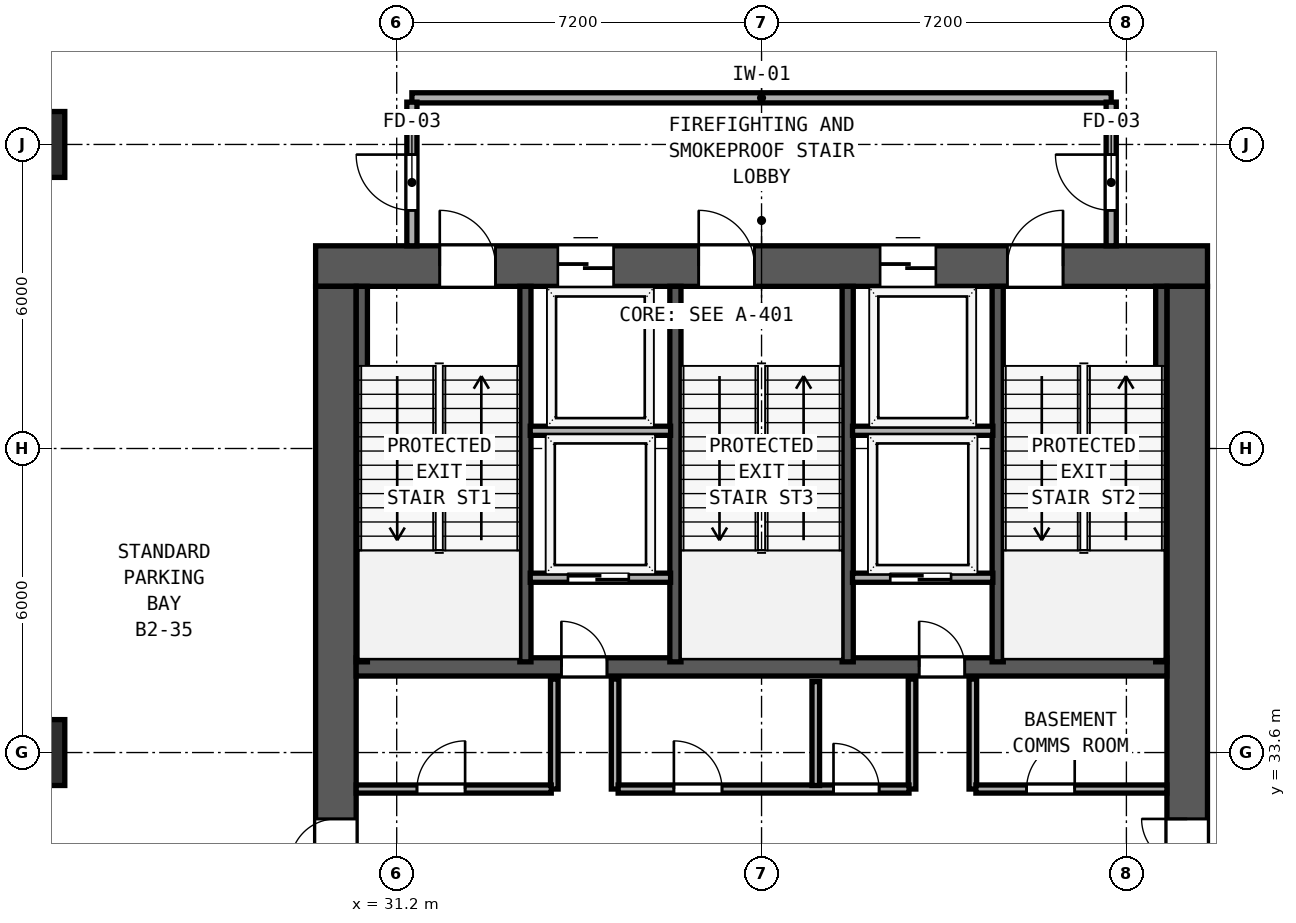
"""IFC4 building model, lengths in metres.
Left out: names, types, materials, properties, quantities, classifications, styles, units other than length and angle.
Written with IfcOpenShell. Run it as: python <this file> out.ifc"""

import sys

from ifc_helpers import new_model, si_unit, direction, frame, frame_2d, origin, origin_2d, place, context, subcontext, project, spatial, rectangle, hollow_rectangle, extrude, element, fill, save


model = new_model("IFC4")
c1 = context("Model", 3, precision=1e-05, world=origin(), true_north=direction((0.0, 1.0)))
c2 = subcontext(c1, "Body", "Model", "MODEL_VIEW")
j1 = project(units=[si_unit("LENGTHUNIT", "METRE"), si_unit("PLANEANGLEUNIT", "RADIAN")], contexts=[c1])
p1 = place(None, origin())
s1 = spatial("IfcSite", under=j1, at=p1, CompositionType="ELEMENT")
p2 = place(p1, origin())
s2 = spatial("IfcBuilding", under=s1, at=p2, CompositionType="ELEMENT")
p3 = place(p2, frame((0.0, 0.0, -9.6)))
s3 = spatial("IfcBuildingStorey", under=s2, at=p3, CompositionType="ELEMENT", Elevation=-9.6)
p4 = place(p3, frame((29.6, 43.2, 0.0), z_axis=(0.0, 0.0, 1.0), x_axis=(1.0, 0.0, 0.0)))
e1 = element("IfcWall", 1, at=p4, inside=s3, PredefinedType="SHEAR", context=c2, shape_type="SweptSolid", body=[
    extrude(rectangle(XDim=17.6, YDim=0.8, at=frame_2d((8.8, 0.0))), origin(), (0.0, 0.0, 1.0), 4.52),
])
p5 = place(p4, frame((2.45, 0.0, 0.0)))
e2 = element("IfcOpeningElement", 2, at=p5, cuts=e1, PredefinedType="OPENING", context=c2, shape_type="SweptSolid", body=[
    extrude(rectangle(XDim=1.1, YDim=2.15, at=frame_2d((0.55, 1.075))), frame((0.0, 0.41, 0.0), z_axis=(0.0, -1.0, 0.0), x_axis=(1.0, 0.0, 0.0)), (0.0, 0.0, 1.0), 0.82),
])
p6 = place(p4, frame((7.56, 0.0, 0.0)))
e3 = element("IfcOpeningElement", 3, at=p6, cuts=e1, PredefinedType="OPENING", context=c2, shape_type="SweptSolid", body=[
    extrude(rectangle(XDim=1.1, YDim=2.15, at=frame_2d((0.55, 1.075))), frame((0.0, 0.41, 0.0), z_axis=(0.0, -1.0, 0.0), x_axis=(1.0, 0.0, 0.0)), (0.0, 0.0, 1.0), 0.82),
])
p7 = place(p4, frame((13.65, 0.0, 0.0)))
e4 = element("IfcOpeningElement", 4, at=p7, cuts=e1, PredefinedType="OPENING", context=c2, shape_type="SweptSolid", body=[
    extrude(rectangle(XDim=1.1, YDim=2.15, at=frame_2d((0.55, 1.075))), frame((0.0, 0.41, 0.0), z_axis=(0.0, -1.0, 0.0), x_axis=(1.0, 0.0, 0.0)), (0.0, 0.0, 1.0), 0.82),
])
p8 = place(p4, frame((4.78, 0.0, 0.0)))
e5 = element("IfcOpeningElement", 5, at=p8, cuts=e1, PredefinedType="OPENING", context=c2, shape_type="SweptSolid", body=[
    extrude(rectangle(XDim=1.1, YDim=2.2, at=frame_2d((0.55, 1.1))), frame((0.0, 0.41, 0.0), z_axis=(0.0, -1.0, 0.0), x_axis=(1.0, 0.0, 0.0)), (0.0, 0.0, 1.0), 0.82),
])
p9 = place(p4, frame((11.14, 0.0, 0.0)))
e6 = element("IfcOpeningElement", 6, at=p9, cuts=e1, PredefinedType="OPENING", context=c2, shape_type="SweptSolid", body=[
    extrude(rectangle(XDim=1.1, YDim=2.2, at=frame_2d((0.55, 1.1))), frame((0.0, 0.41, 0.0), z_axis=(0.0, -1.0, 0.0), x_axis=(1.0, 0.0, 0.0)), (0.0, 0.0, 1.0), 0.82),
])
p10 = place(p3, frame((30.0, 26.8, 0.0), z_axis=(0.0, 0.0, 1.0), x_axis=(0.0, 1.0, 0.0)))
e7 = element("IfcWall", 7, at=p10, inside=s3, PredefinedType="SHEAR", context=c2, shape_type="SweptSolid", body=[
    extrude(rectangle(XDim=16.0, YDim=0.8, at=frame_2d((8.0, 0.0))), origin(), (0.0, 0.0, 1.0), 4.52),
])
p11 = place(p10, frame((4.59, 0.0, 0.0)))
e8 = element("IfcOpeningElement", 8, at=p11, cuts=e7, PredefinedType="OPENING", context=c2, shape_type="SweptSolid", body=[
    extrude(rectangle(XDim=0.9, YDim=2.1, at=frame_2d((0.45, 1.05))), frame((0.0, 0.41, 0.0), z_axis=(0.0, -1.0, 0.0), x_axis=(1.0, 0.0, 0.0)), (0.0, 0.0, 1.0), 0.82),
])
p12 = place(p3, frame((46.8, 26.8, 0.0), z_axis=(0.0, 0.0, 1.0), x_axis=(0.0, 1.0, 0.0)))
e9 = element("IfcWall", 9, at=p12, inside=s3, PredefinedType="SHEAR", context=c2, shape_type="SweptSolid", body=[
    extrude(rectangle(XDim=16.0, YDim=0.8, at=frame_2d((8.0, 0.0))), origin(), (0.0, 0.0, 1.0), 4.52),
])
p13 = place(p12, frame((5.49, 0.0, 0.0), z_axis=(0.0, 0.0, 1.0), x_axis=(-1.0, 0.0, 0.0)))
e10 = element("IfcOpeningElement", 10, at=p13, cuts=e9, PredefinedType="OPENING", context=c2, shape_type="SweptSolid", body=[
    extrude(rectangle(XDim=0.9, YDim=2.1, at=frame_2d((0.45, 1.05))), frame((0.0, 0.41, 0.0), z_axis=(0.0, -1.0, 0.0), x_axis=(1.0, 0.0, 0.0)), (0.0, 0.0, 1.0), 0.82),
])
p14 = place(p3, frame((30.4, 35.29, 0.0), z_axis=(0.0, 0.0, 1.0), x_axis=(1.0, 0.0, 0.0)))
e11 = element("IfcWall", 11, at=p14, inside=s3, PredefinedType="SHEAR", context=c2, shape_type="SweptSolid", body=[
    extrude(rectangle(XDim=16.0, YDim=0.36, at=frame_2d((8.0, 0.0))), origin(), (0.0, 0.0, 1.0), 4.52),
])
p15 = place(p14, frame((4.95, 0.0, 0.0), z_axis=(0.0, 0.0, 1.0), x_axis=(-1.0, 0.0, 0.0)))
e12 = element("IfcOpeningElement", 12, at=p15, cuts=e11, PredefinedType="OPENING", context=c2, shape_type="SweptSolid", body=[
    extrude(rectangle(XDim=0.9, YDim=2.1, at=frame_2d((0.45, 1.05))), frame((0.0, 0.19, 0.0), z_axis=(0.0, -1.0, 0.0), x_axis=(1.0, 0.0, 0.0)), (0.0, 0.0, 1.0), 0.38),
])
p16 = place(p14, frame((12.01, 0.0, 0.0), z_axis=(0.0, 0.0, 1.0), x_axis=(-1.0, 0.0, 0.0)))
e13 = element("IfcOpeningElement", 13, at=p16, cuts=e11, PredefinedType="OPENING", context=c2, shape_type="SweptSolid", body=[
    extrude(rectangle(XDim=0.9, YDim=2.1, at=frame_2d((0.45, 1.05))), frame((0.0, 0.19, 0.0), z_axis=(0.0, -1.0, 0.0), x_axis=(1.0, 0.0, 0.0)), (0.0, 0.0, 1.0), 0.38),
])
for number, where, z_axis, x_axis in (
    (14, (30.512, 35.39, 0.0), (0.0, 0.0, 1.0), (0.0, 1.0, 0.0)),
    (15, (33.74, 35.39, 0.0), (0.0, 0.0, 1.0), (0.0, 1.0, 0.0)),
    (16, (36.7, 35.39, 0.0), (0.0, 0.0, 1.0), (0.0, 1.0, 0.0)),
    (17, (40.1, 35.39, 0.0), (0.0, 0.0, 1.0), (0.0, 1.0, 0.0)),
    (18, (43.06, 35.39, 0.0), (0.0, 0.0, 1.0), (0.0, 1.0, 0.0)),
    (19, (46.288, 35.39, 0.0), (0.0, 0.0, 1.0), (0.0, 1.0, 0.0)),
):
    element("IfcWall", number, at=place(p3, frame(where, z_axis=z_axis, x_axis=x_axis)), inside=s3, PredefinedType="SHEAR", context=c2, shape_type="SweptSolid", body=[
        extrude(rectangle(XDim=7.41, YDim=0.22, at=frame_2d((3.705, 0.0))), origin(), (0.0, 0.0, 1.0), 4.52),
    ])
for number, where, z_axis, x_axis in (
    (20, (24.0, 33.6, 0.0), (0.0, 0.0, 1.0), (1.0, 0.0, 0.0)),
    (21, (24.0, 45.6, 0.0), (0.0, 0.0, 1.0), (1.0, 0.0, 0.0)),
):
    element("IfcColumn", number, at=place(p3, frame(where, z_axis=z_axis, x_axis=x_axis)), inside=s3, PredefinedType="COLUMN", context=c2, shape_type="SweptSolid", body=[
        extrude(hollow_rectangle(XDim=1.3, YDim=1.3, WallThickness=0.048, at=origin_2d()), origin(), (0.0, 0.0, 1.0), 4.8),
    ])
p17 = place(p3, frame((31.5, 46.52, 0.0), z_axis=(0.0, 0.0, 1.0), x_axis=(1.0, 0.0, 0.0)))
e22 = element("IfcWall", 22, at=p17, inside=s3, PredefinedType="SOLIDWALL", context=c2, shape_type="SweptSolid", body=[
    extrude(rectangle(XDim=13.8, YDim=0.2, at=frame_2d((6.9, 0.0))), origin(), (0.0, 0.0, 1.0), 4.52),
])
p18 = place(p3, frame((31.5, 43.6, 0.0), z_axis=(0.0, 0.0, 1.0), x_axis=(0.0, 1.0, 0.0)))
e23 = element("IfcWall", 23, at=p18, inside=s3, PredefinedType="SOLIDWALL", context=c2, shape_type="SweptSolid", body=[
    extrude(rectangle(XDim=2.835, YDim=0.2, at=frame_2d((1.417, 0.0))), origin(), (0.0, 0.0, 1.0), 4.52),
])
p19 = place(p18, frame((1.8, 0.0, 0.0), z_axis=(0.0, 0.0, 1.0), x_axis=(-1.0, 0.0, 0.0)))
e24 = element("IfcOpeningElement", 24, at=p19, cuts=e23, PredefinedType="OPENING", context=c2, shape_type="SweptSolid", body=[
    extrude(rectangle(XDim=1.1, YDim=2.15, at=frame_2d((0.55, 1.075))), frame((0.0, 0.11, 0.0), z_axis=(0.0, -1.0, 0.0), x_axis=(1.0, 0.0, 0.0)), (0.0, 0.0, 1.0), 0.22),
])
p20 = place(p3, frame((45.3, 43.6, 0.0), z_axis=(0.0, 0.0, 1.0), x_axis=(0.0, 1.0, 0.0)))
e25 = element("IfcWall", 25, at=p20, inside=s3, PredefinedType="SOLIDWALL", context=c2, shape_type="SweptSolid", body=[
    extrude(rectangle(XDim=2.835, YDim=0.2, at=frame_2d((1.417, 0.0))), origin(), (0.0, 0.0, 1.0), 4.52),
])
p21 = place(p20, frame((0.7, 0.0, 0.0)))
e26 = element("IfcOpeningElement", 26, at=p21, cuts=e25, PredefinedType="OPENING", context=c2, shape_type="SweptSolid", body=[
    extrude(rectangle(XDim=1.1, YDim=2.15, at=frame_2d((0.55, 1.075))), frame((0.0, 0.11, 0.0), z_axis=(0.0, -1.0, 0.0), x_axis=(1.0, 0.0, 0.0)), (0.0, 0.0, 1.0), 0.22),
])
for number, where, z_axis, x_axis in (
    (27, (33.835, 39.95, 0.0), (0.0, 0.0, 1.0), (1.0, 0.0, 0.0)),
    (28, (40.195, 39.95, 0.0), (0.0, 0.0, 1.0), (1.0, 0.0, 0.0)),
):
    element("IfcWall", number, at=place(p3, frame(where, z_axis=z_axis, x_axis=x_axis)), inside=s3, PredefinedType="SOLIDWALL", context=c2, shape_type="SweptSolid", body=[
        extrude(rectangle(XDim=2.77, YDim=0.18, at=frame_2d((1.385, 0.0))), origin(), (0.0, 0.0, 1.0), 4.52),
    ])
p22 = place(p3, frame((33.835, 37.05, 0.0), z_axis=(0.0, 0.0, 1.0), x_axis=(1.0, 0.0, 0.0)))
e29 = element("IfcWall", 29, at=p22, inside=s3, PredefinedType="SOLIDWALL", context=c2, shape_type="SweptSolid", body=[
    extrude(rectangle(XDim=2.77, YDim=0.18, at=frame_2d((1.385, 0.0))), origin(), (0.0, 0.0, 1.0), 4.52),
])
p23 = place(p22, frame((1.945, 0.0, 0.0), z_axis=(0.0, 0.0, 1.0), x_axis=(-1.0, 0.0, 0.0)))
e30 = element("IfcOpeningElement", 30, at=p23, cuts=e29, PredefinedType="OPENING", context=c2, shape_type="SweptSolid", body=[
    extrude(rectangle(XDim=1.2, YDim=2.2, at=frame_2d((0.6, 1.1))), frame((0.0, 0.1, 0.0), z_axis=(0.0, -1.0, 0.0), x_axis=(1.0, 0.0, 0.0)), (0.0, 0.0, 1.0), 0.2),
])
for number, where, z_axis, x_axis in (
    (31, (34.31, 32.88, 0.0), (0.0, 0.0, 1.0), (0.0, 1.0, 0.0)),
    (32, (35.51, 32.88, 0.0), (0.0, 0.0, 1.0), (0.0, 1.0, 0.0)),
):
    element("IfcWall", number, at=place(p3, frame(where, z_axis=z_axis, x_axis=x_axis)), inside=s3, PredefinedType="SOLIDWALL", context=c2, shape_type="SweptSolid", body=[
        extrude(rectangle(XDim=2.17, YDim=0.15, at=frame_2d((1.085, 0.0))), origin(), (0.0, 0.0, 1.0), 4.52),
    ])
p24 = place(p3, frame((40.195, 37.05, 0.0), z_axis=(0.0, 0.0, 1.0), x_axis=(1.0, 0.0, 0.0)))
e33 = element("IfcWall", 33, at=p24, inside=s3, PredefinedType="SOLIDWALL", context=c2, shape_type="SweptSolid", body=[
    extrude(rectangle(XDim=2.77, YDim=0.18, at=frame_2d((1.385, 0.0))), origin(), (0.0, 0.0, 1.0), 4.52),
])
p25 = place(p24, frame((1.945, 0.0, 0.0), z_axis=(0.0, 0.0, 1.0), x_axis=(-1.0, 0.0, 0.0)))
e34 = element("IfcOpeningElement", 34, at=p25, cuts=e33, PredefinedType="OPENING", context=c2, shape_type="SweptSolid", body=[
    extrude(rectangle(XDim=1.2, YDim=2.2, at=frame_2d((0.6, 1.1))), frame((0.0, 0.1, 0.0), z_axis=(0.0, -1.0, 0.0), x_axis=(1.0, 0.0, 0.0)), (0.0, 0.0, 1.0), 0.2),
])
for number, where, z_axis, x_axis in (
    (35, (41.37, 32.88, 0.0), (0.0, 0.0, 1.0), (0.0, 1.0, 0.0)),
    (36, (42.57, 32.88, 0.0), (0.0, 0.0, 1.0), (0.0, 1.0, 0.0)),
):
    element("IfcWall", number, at=place(p3, frame(where, z_axis=z_axis, x_axis=x_axis)), inside=s3, PredefinedType="SOLIDWALL", context=c2, shape_type="SweptSolid", body=[
        extrude(rectangle(XDim=2.17, YDim=0.15, at=frame_2d((1.085, 0.0))), origin(), (0.0, 0.0, 1.0), 4.52),
    ])
p26 = place(p3, frame((30.4, 32.88, 0.0), z_axis=(0.0, 0.0, 1.0), x_axis=(1.0, 0.0, 0.0)))
e37 = element("IfcWall", 37, at=p26, inside=s3, PredefinedType="SOLIDWALL", context=c2, shape_type="SweptSolid", body=[
    extrude(rectangle(XDim=3.85, YDim=0.16, at=frame_2d((1.925, 0.0))), origin(), (0.0, 0.0, 1.0), 4.52),
])
p27 = place(p26, frame((2.15, 0.0, 0.0), z_axis=(0.0, 0.0, 1.0), x_axis=(-1.0, 0.0, 0.0)))
e38 = element("IfcOpeningElement", 38, at=p27, cuts=e37, PredefinedType="OPENING", context=c2, shape_type="SweptSolid", body=[
    extrude(rectangle(XDim=0.95, YDim=2.12, at=frame_2d((0.475, 1.06))), frame((0.0, 0.09, 0.0), z_axis=(0.0, -1.0, 0.0), x_axis=(1.0, 0.0, 0.0)), (0.0, 0.0, 1.0), 0.18),
])
p28 = place(p3, frame((35.57, 32.88, 0.0), z_axis=(0.0, 0.0, 1.0), x_axis=(1.0, 0.0, 0.0)))
e39 = element("IfcWall", 39, at=p28, inside=s3, PredefinedType="SOLIDWALL", context=c2, shape_type="SweptSolid", body=[
    extrude(rectangle(XDim=5.74, YDim=0.16, at=frame_2d((2.87, 0.0))), origin(), (0.0, 0.0, 1.0), 4.52),
])
p29 = place(p28, frame((2.05, 0.0, 0.0), z_axis=(0.0, 0.0, 1.0), x_axis=(-1.0, 0.0, 0.0)))
e40 = element("IfcOpeningElement", 40, at=p29, cuts=e39, PredefinedType="OPENING", context=c2, shape_type="SweptSolid", body=[
    extrude(rectangle(XDim=0.95, YDim=2.12, at=frame_2d((0.475, 1.06))), frame((0.0, 0.09, 0.0), z_axis=(0.0, -1.0, 0.0), x_axis=(1.0, 0.0, 0.0)), (0.0, 0.0, 1.0), 0.18),
])
p30 = place(p28, frame((5.15, 0.0, 0.0), z_axis=(0.0, 0.0, 1.0), x_axis=(-1.0, 0.0, 0.0)))
e41 = element("IfcOpeningElement", 41, at=p30, cuts=e39, PredefinedType="OPENING", context=c2, shape_type="SweptSolid", body=[
    extrude(rectangle(XDim=0.9, YDim=2.1, at=frame_2d((0.45, 1.05))), frame((0.0, 0.09, 0.0), z_axis=(0.0, -1.0, 0.0), x_axis=(1.0, 0.0, 0.0)), (0.0, 0.0, 1.0), 0.18),
])
p31 = place(p3, frame((42.63, 32.88, 0.0), z_axis=(0.0, 0.0, 1.0), x_axis=(1.0, 0.0, 0.0)))
e42 = element("IfcWall", 42, at=p31, inside=s3, PredefinedType="SOLIDWALL", context=c2, shape_type="SweptSolid", body=[
    extrude(rectangle(XDim=3.77, YDim=0.16, at=frame_2d((1.885, 0.0))), origin(), (0.0, 0.0, 1.0), 4.52),
])
p32 = place(p31, frame((1.95, 0.0, 0.0), z_axis=(0.0, 0.0, 1.0), x_axis=(-1.0, 0.0, 0.0)))
e43 = element("IfcOpeningElement", 43, at=p32, cuts=e42, PredefinedType="OPENING", context=c2, shape_type="SweptSolid", body=[
    extrude(rectangle(XDim=0.95, YDim=2.12, at=frame_2d((0.475, 1.06))), frame((0.0, 0.09, 0.0), z_axis=(0.0, -1.0, 0.0), x_axis=(1.0, 0.0, 0.0)), (0.0, 0.0, 1.0), 0.18),
])
p33 = place(p3, frame((39.47, 32.95, 0.0), z_axis=(0.0, 0.0, 1.0), x_axis=(0.0, 1.0, 0.0)))
e44 = element("IfcWall", 44, at=p33, inside=s3, PredefinedType="SOLIDWALL", context=c2, shape_type="SweptSolid", body=[
    extrude(rectangle(XDim=2.05, YDim=0.15, at=frame_2d((1.025, 0.0))), origin(), (0.0, 0.0, 1.0), 4.52),
])
p34 = place(p5, origin())
e45 = element("IfcDoor", 45, at=p34, inside=s3, OperationType="SINGLE_SWING_LEFT", PredefinedType="DOOR", context=c2, shape_type="SweptSolid", body=[
    extrude(rectangle(XDim=1.1, YDim=2.15, at=frame_2d((0.55, 1.075))), frame((0.0, 0.185, 0.0), z_axis=(0.0, -1.0, 0.0), x_axis=(1.0, 0.0, 0.0)), (0.0, 0.0, 1.0), 0.05),
])
fill(e2, e45)
p35 = place(p6, origin())
e46 = element("IfcDoor", 46, at=p35, inside=s3, OperationType="SINGLE_SWING_LEFT", PredefinedType="DOOR", context=c2, shape_type="SweptSolid", body=[
    extrude(rectangle(XDim=1.1, YDim=2.15, at=frame_2d((0.55, 1.075))), frame((0.0, 0.185, 0.0), z_axis=(0.0, -1.0, 0.0), x_axis=(1.0, 0.0, 0.0)), (0.0, 0.0, 1.0), 0.05),
])
fill(e3, e46)
p36 = place(p7, origin())
e47 = element("IfcDoor", 47, at=p36, inside=s3, OperationType="SINGLE_SWING_RIGHT", PredefinedType="DOOR", context=c2, shape_type="SweptSolid", body=[
    extrude(rectangle(XDim=1.1, YDim=2.15, at=frame_2d((0.55, 1.075))), frame((0.0, 0.185, 0.0), z_axis=(0.0, -1.0, 0.0), x_axis=(1.0, 0.0, 0.0)), (0.0, 0.0, 1.0), 0.05),
])
fill(e4, e47)
p37 = place(p19, origin())
e48 = element("IfcDoor", 48, at=p37, inside=s3, OperationType="SINGLE_SWING_LEFT", PredefinedType="DOOR", context=c2, shape_type="SweptSolid", body=[
    extrude(rectangle(XDim=1.1, YDim=2.15, at=frame_2d((0.55, 1.075))), frame((0.0, 0.025, 0.0), z_axis=(0.0, -1.0, 0.0), x_axis=(1.0, 0.0, 0.0)), (0.0, 0.0, 1.0), 0.05),
])
fill(e24, e48)
p38 = place(p21, origin())
e49 = element("IfcDoor", 49, at=p38, inside=s3, OperationType="SINGLE_SWING_RIGHT", PredefinedType="DOOR", context=c2, shape_type="SweptSolid", body=[
    extrude(rectangle(XDim=1.1, YDim=2.15, at=frame_2d((0.55, 1.075))), frame((0.0, 0.025, 0.0), z_axis=(0.0, -1.0, 0.0), x_axis=(1.0, 0.0, 0.0)), (0.0, 0.0, 1.0), 0.05),
])
fill(e26, e49)
p39 = place(p8, origin())
e50 = element("IfcDoor", 50, at=p39, inside=s3, OperationType="SLIDING_TO_LEFT", PredefinedType="DOOR", context=c2, shape_type="SweptSolid", body=[
    extrude(rectangle(XDim=1.1, YDim=2.2, at=frame_2d((0.55, 1.1))), frame((0.0, 0.185, 0.0), z_axis=(0.0, -1.0, 0.0), x_axis=(1.0, 0.0, 0.0)), (0.0, 0.0, 1.0), 0.05),
])
fill(e5, e50)
p40 = place(p9, origin())
e51 = element("IfcDoor", 51, at=p40, inside=s3, OperationType="SLIDING_TO_LEFT", PredefinedType="DOOR", context=c2, shape_type="SweptSolid", body=[
    extrude(rectangle(XDim=1.1, YDim=2.2, at=frame_2d((0.55, 1.1))), frame((0.0, 0.185, 0.0), z_axis=(0.0, -1.0, 0.0), x_axis=(1.0, 0.0, 0.0)), (0.0, 0.0, 1.0), 0.05),
])
fill(e6, e51)
p41 = place(p23, origin())
e52 = element("IfcDoor", 52, at=p41, inside=s3, OperationType="SLIDING_TO_RIGHT", PredefinedType="DOOR", context=c2, shape_type="SweptSolid", body=[
    extrude(rectangle(XDim=1.2, YDim=2.2, at=frame_2d((0.6, 1.1))), frame((0.0, 0.025, 0.0), z_axis=(0.0, -1.0, 0.0), x_axis=(1.0, 0.0, 0.0)), (0.0, 0.0, 1.0), 0.05),
])
fill(e30, e52)
p42 = place(p15, origin())
e53 = element("IfcDoor", 53, at=p42, inside=s3, OperationType="SINGLE_SWING_RIGHT", PredefinedType="DOOR", context=c2, shape_type="SweptSolid", body=[
    extrude(rectangle(XDim=0.9, YDim=2.1, at=frame_2d((0.45, 1.05))), frame((0.0, 0.025, 0.0), z_axis=(0.0, -1.0, 0.0), x_axis=(1.0, 0.0, 0.0)), (0.0, 0.0, 1.0), 0.05),
])
fill(e12, e53)
p43 = place(p25, origin())
e54 = element("IfcDoor", 54, at=p43, inside=s3, OperationType="SLIDING_TO_RIGHT", PredefinedType="DOOR", context=c2, shape_type="SweptSolid", body=[
    extrude(rectangle(XDim=1.2, YDim=2.2, at=frame_2d((0.6, 1.1))), frame((0.0, 0.025, 0.0), z_axis=(0.0, -1.0, 0.0), x_axis=(1.0, 0.0, 0.0)), (0.0, 0.0, 1.0), 0.05),
])
fill(e34, e54)
p44 = place(p16, origin())
e55 = element("IfcDoor", 55, at=p44, inside=s3, OperationType="SINGLE_SWING_RIGHT", PredefinedType="DOOR", context=c2, shape_type="SweptSolid", body=[
    extrude(rectangle(XDim=0.9, YDim=2.1, at=frame_2d((0.45, 1.05))), frame((0.0, 0.025, 0.0), z_axis=(0.0, -1.0, 0.0), x_axis=(1.0, 0.0, 0.0)), (0.0, 0.0, 1.0), 0.05),
])
fill(e13, e55)
p45 = place(p11, origin())
e56 = element("IfcDoor", 56, at=p45, inside=s3, OperationType="SINGLE_SWING_LEFT", PredefinedType="DOOR", context=c2, shape_type="SweptSolid", body=[
    extrude(rectangle(XDim=0.9, YDim=2.1, at=frame_2d((0.45, 1.05))), frame((0.0, 0.025, 0.0), z_axis=(0.0, -1.0, 0.0), x_axis=(1.0, 0.0, 0.0)), (0.0, 0.0, 1.0), 0.05),
])
fill(e8, e56)
p46 = place(p13, origin())
e57 = element("IfcDoor", 57, at=p46, inside=s3, OperationType="SINGLE_SWING_LEFT", PredefinedType="DOOR", context=c2, shape_type="SweptSolid", body=[
    extrude(rectangle(XDim=0.9, YDim=2.1, at=frame_2d((0.45, 1.05))), frame((0.0, 0.025, 0.0), z_axis=(0.0, -1.0, 0.0), x_axis=(1.0, 0.0, 0.0)), (0.0, 0.0, 1.0), 0.05),
])
fill(e10, e57)
p47 = place(p27, origin())
e58 = element("IfcDoor", 58, at=p47, inside=s3, OperationType="SINGLE_SWING_LEFT", PredefinedType="DOOR", context=c2, shape_type="SweptSolid", body=[
    extrude(rectangle(XDim=0.95, YDim=2.12, at=frame_2d((0.475, 1.06))), frame((0.0, 0.025, 0.0), z_axis=(0.0, -1.0, 0.0), x_axis=(1.0, 0.0, 0.0)), (0.0, 0.0, 1.0), 0.05),
])
fill(e38, e58)
p48 = place(p29, origin())
e59 = element("IfcDoor", 59, at=p48, inside=s3, OperationType="SINGLE_SWING_RIGHT", PredefinedType="DOOR", context=c2, shape_type="SweptSolid", body=[
    extrude(rectangle(XDim=0.95, YDim=2.12, at=frame_2d((0.475, 1.06))), frame((0.0, 0.025, 0.0), z_axis=(0.0, -1.0, 0.0), x_axis=(1.0, 0.0, 0.0)), (0.0, 0.0, 1.0), 0.05),
])
fill(e40, e59)
p49 = place(p30, origin())
e60 = element("IfcDoor", 60, at=p49, inside=s3, OperationType="SINGLE_SWING_RIGHT", PredefinedType="DOOR", context=c2, shape_type="SweptSolid", body=[
    extrude(rectangle(XDim=0.9, YDim=2.1, at=frame_2d((0.45, 1.05))), frame((0.0, 0.025, 0.0), z_axis=(0.0, -1.0, 0.0), x_axis=(1.0, 0.0, 0.0)), (0.0, 0.0, 1.0), 0.05),
])
fill(e41, e60)
p50 = place(p32, origin())
e61 = element("IfcDoor", 61, at=p50, inside=s3, OperationType="SINGLE_SWING_LEFT", PredefinedType="DOOR", context=c2, shape_type="SweptSolid", body=[
    extrude(rectangle(XDim=0.95, YDim=2.12, at=frame_2d((0.475, 1.06))), frame((0.0, 0.025, 0.0), z_axis=(0.0, -1.0, 0.0), x_axis=(1.0, 0.0, 0.0)), (0.0, 0.0, 1.0), 0.05),
])
fill(e43, e61)
save(model, sys.argv[1])
